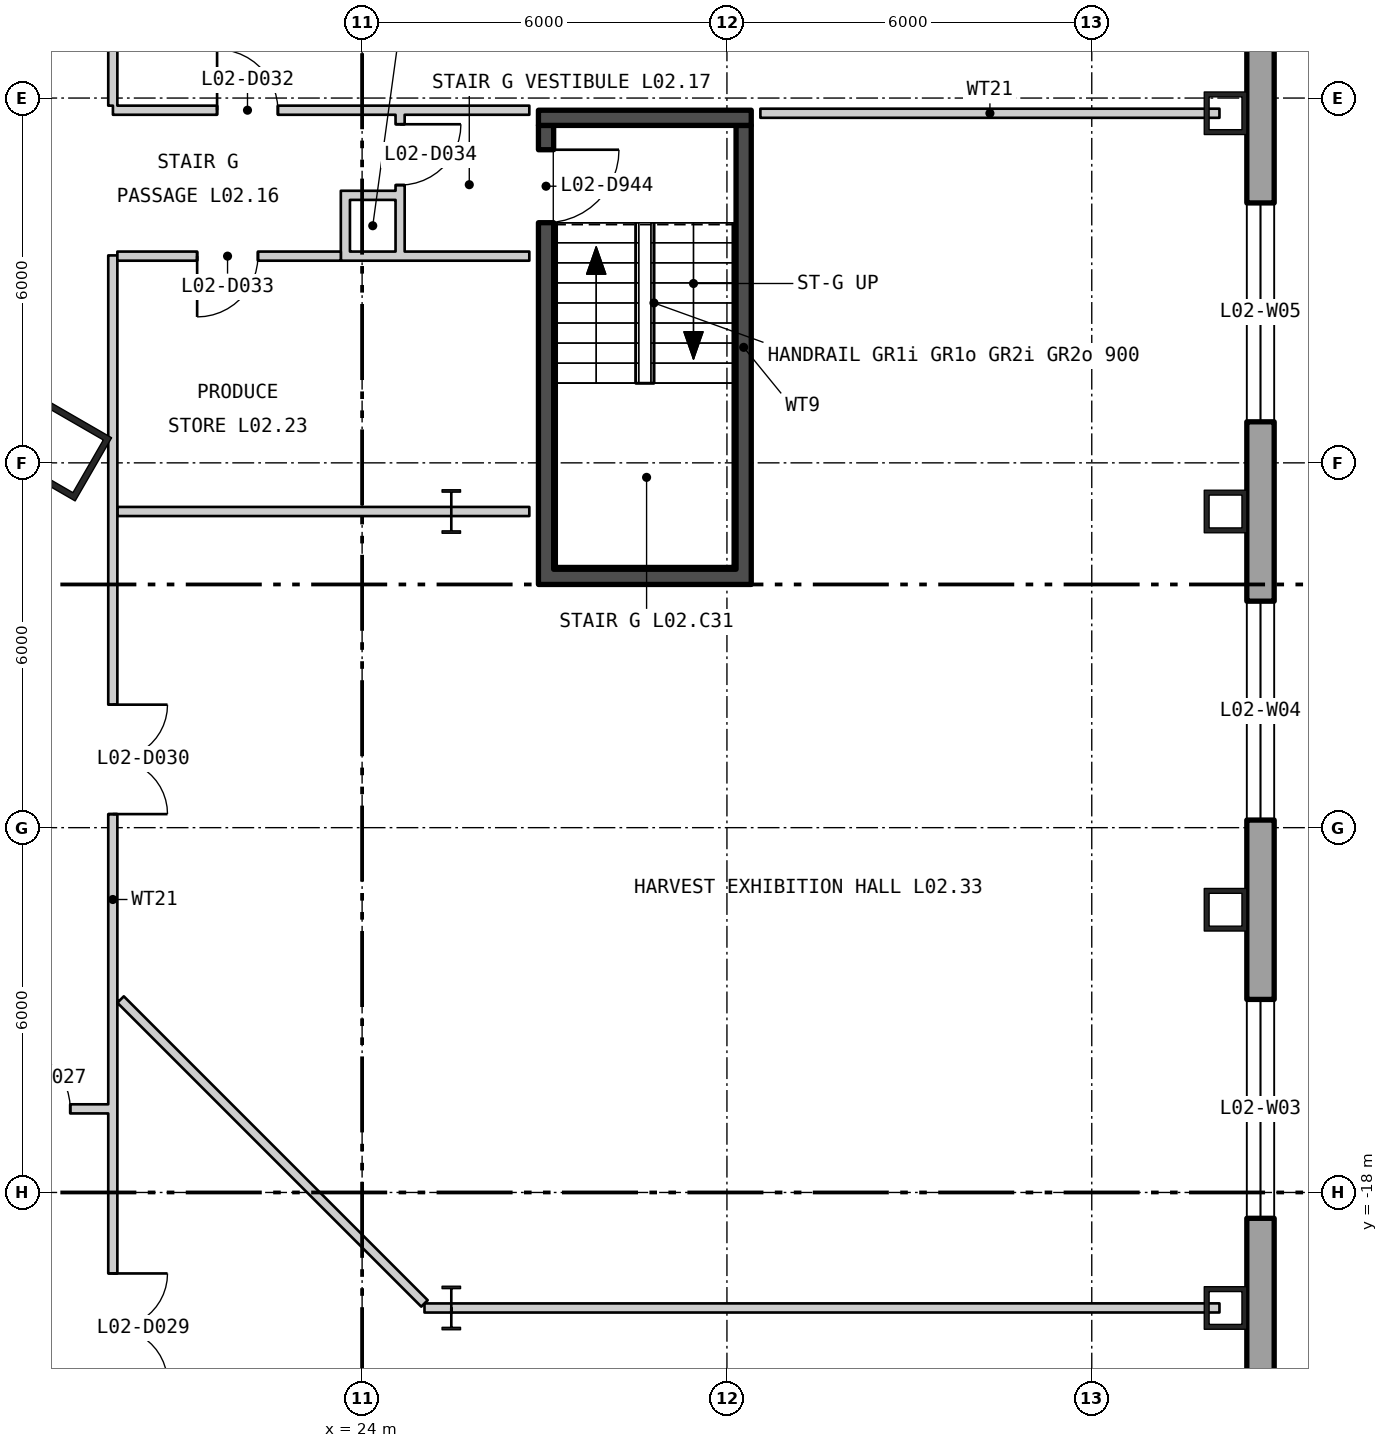
"""IFC4 building model, lengths in metres.
Left out: names, types, materials, properties, quantities, classifications, styles, units other than length and angle.
Written with IfcOpenShell. Run it as: python <this file> out.ifc"""

import sys

from ifc_helpers import new_model, si_unit, direction, frame, frame_2d, origin, origin_2d, place, context, subcontext, project, spatial, polyline, rectangle, hollow_rectangle, i_section, outline, extrude, element, fill, save


model = new_model("IFC4")
c1 = context("Model", 3, precision=1e-05, world=origin(), true_north=direction((0.0, 1.0)))
c2 = subcontext(c1, "Body", "Model", "MODEL_VIEW")
j1 = project(units=[si_unit("LENGTHUNIT", "METRE"), si_unit("PLANEANGLEUNIT", "RADIAN")], contexts=[c1])
p1 = place(None, origin())
s1 = spatial("IfcSite", under=j1, at=p1, CompositionType="ELEMENT")
p2 = place(p1, origin())
s2 = spatial("IfcBuilding", under=s1, at=p2, CompositionType="ELEMENT")
p3 = place(p2, frame((0.0, 0.0, 13.5)))
s3 = spatial("IfcBuildingStorey", under=s2, at=p3, CompositionType="ELEMENT", Elevation=13.5)
p4 = place(p3, frame((19.061, -5.807, 0.0), z_axis=(0.0, 0.0, 1.0), x_axis=(0.5, 0.866025403784, 0.0)))
e1 = element("IfcColumn", 1, at=p4, inside=s3, PredefinedType="COLUMN", context=c2, shape_type="SweptSolid", body=[
    extrude(hollow_rectangle(XDim=1.2, YDim=1.2, WallThickness=0.1, at=origin_2d()), origin(), (0.0, 0.0, 1.0), 5.1),
])
for number, where, z_axis, x_axis in (
    (2, (38.2, -19.9, 0.0), (0.0, 0.0, 1.0), (0.0, 1.0, 0.0)),
    (3, (38.2, -13.35, 0.0), (0.0, 0.0, 1.0), (0.0, 1.0, 0.0)),
    (4, (38.2, -6.8, 0.0), (0.0, 0.0, 1.0), (0.0, 1.0, 0.0)),
    (5, (38.2, -0.25, 0.0), (0.0, 0.0, 1.0), (0.0, 1.0, 0.0)),
):
    element("IfcColumn", number, at=place(p3, frame(where, z_axis=z_axis, x_axis=x_axis)), inside=s3, PredefinedType="COLUMN", context=c2, shape_type="SweptSolid", body=[
        extrude(hollow_rectangle(XDim=0.7, YDim=0.7, WallThickness=0.08, at=origin_2d()), origin(), (0.0, 0.0, 1.0), 5.1),
    ])
for number, where, z_axis, x_axis in (
    (6, (25.467, -6.8, 0.0), (0.0, 0.0, 1.0), (1.0, 0.0, 0.0)),
    (7, (25.467, -19.9, 0.0), (0.0, 0.0, 1.0), (1.0, 0.0, 0.0)),
):
    element("IfcColumn", number, at=place(p3, frame(where, z_axis=z_axis, x_axis=x_axis)), inside=s3, PredefinedType="COLUMN", context=c2, shape_type="SweptSolid", body=[
        extrude(i_section(OverallWidth=0.304, OverallDepth=0.716, WebThickness=0.021, FlangeThickness=0.04, at=origin_2d()), origin(), (0.0, 0.0, 1.0), 5.1),
    ])
p5 = place(p3, frame((38.775, -33.575, -0.4), z_axis=(0.0, 0.0, 1.0), x_axis=(0.0, 1.0, 0.0)))
e8 = element("IfcWall", 8, at=p5, inside=s3, PredefinedType="SOLIDWALL", context=c2, shape_type="SweptSolid", body=[
    extrude(outline(polyline([(-0.225, -0.225), (53.775, -0.225), (53.325, 0.225), (0.225, 0.225), (-0.225, -0.225)])), origin(), (0.0, 0.0, 1.0), 5.1),
])
p6 = place(p5, frame((2.05, 0.0, 1.3)))
e9 = element("IfcOpeningElement", 9, at=p6, cuts=e8, PredefinedType="OPENING", context=c2, shape_type="SweptSolid", body=[
    extrude(rectangle(XDim=3.6, YDim=3.2, at=frame_2d((1.8, 1.6))), frame((0.0, 0.235, 0.0), z_axis=(0.0, -1.0, 0.0), x_axis=(1.0, 0.0, 0.0)), (0.0, 0.0, 1.0), 0.47),
])
p7 = place(p5, frame((8.6, 0.0, 1.3)))
e10 = element("IfcOpeningElement", 10, at=p7, cuts=e8, PredefinedType="OPENING", context=c2, shape_type="SweptSolid", body=[
    extrude(rectangle(XDim=3.6, YDim=3.2, at=frame_2d((1.8, 1.6))), frame((0.0, 0.235, 0.0), z_axis=(0.0, -1.0, 0.0), x_axis=(1.0, 0.0, 0.0)), (0.0, 0.0, 1.0), 0.47),
])
p8 = place(p5, frame((15.15, 0.0, 1.3)))
e11 = element("IfcOpeningElement", 11, at=p8, cuts=e8, PredefinedType="OPENING", context=c2, shape_type="SweptSolid", body=[
    extrude(rectangle(XDim=3.6, YDim=3.2, at=frame_2d((1.8, 1.6))), frame((0.0, 0.235, 0.0), z_axis=(0.0, -1.0, 0.0), x_axis=(1.0, 0.0, 0.0)), (0.0, 0.0, 1.0), 0.47),
])
p9 = place(p5, frame((21.7, 0.0, 1.3)))
e12 = element("IfcOpeningElement", 12, at=p9, cuts=e8, PredefinedType="OPENING", context=c2, shape_type="SweptSolid", body=[
    extrude(rectangle(XDim=3.6, YDim=3.2, at=frame_2d((1.8, 1.6))), frame((0.0, 0.235, 0.0), z_axis=(0.0, -1.0, 0.0), x_axis=(1.0, 0.0, 0.0)), (0.0, 0.0, 1.0), 0.47),
])
p10 = place(p5, frame((28.25, 0.0, 1.3)))
e13 = element("IfcOpeningElement", 13, at=p10, cuts=e8, PredefinedType="OPENING", context=c2, shape_type="SweptSolid", body=[
    extrude(rectangle(XDim=3.6, YDim=3.2, at=frame_2d((1.8, 1.6))), frame((0.0, 0.235, 0.0), z_axis=(0.0, -1.0, 0.0), x_axis=(1.0, 0.0, 0.0)), (0.0, 0.0, 1.0), 0.47),
])
p11 = place(p5, frame((34.8, 0.0, 1.3)))
e14 = element("IfcOpeningElement", 14, at=p11, cuts=e8, PredefinedType="OPENING", context=c2, shape_type="SweptSolid", body=[
    extrude(rectangle(XDim=3.6, YDim=3.2, at=frame_2d((1.8, 1.6))), frame((0.0, 0.235, 0.0), z_axis=(0.0, -1.0, 0.0), x_axis=(1.0, 0.0, 0.0)), (0.0, 0.0, 1.0), 0.47),
])
p12 = place(p5, frame((41.35, 0.0, 1.3)))
e15 = element("IfcOpeningElement", 15, at=p12, cuts=e8, PredefinedType="OPENING", context=c2, shape_type="SweptSolid", body=[
    extrude(rectangle(XDim=3.6, YDim=3.2, at=frame_2d((1.8, 1.6))), frame((0.0, 0.235, 0.0), z_axis=(0.0, -1.0, 0.0), x_axis=(1.0, 0.0, 0.0)), (0.0, 0.0, 1.0), 0.47),
])
p13 = place(p5, frame((47.9, 0.0, 1.3)))
e16 = element("IfcOpeningElement", 16, at=p13, cuts=e8, PredefinedType="OPENING", context=c2, shape_type="SweptSolid", body=[
    extrude(rectangle(XDim=3.6, YDim=3.2, at=frame_2d((1.8, 1.6))), frame((0.0, 0.235, 0.0), z_axis=(0.0, -1.0, 0.0), x_axis=(1.0, 0.0, 0.0)), (0.0, 0.0, 1.0), 0.47),
])
p14 = place(p3, frame((27.025, -7.75, 0.0), z_axis=(0.0, 0.0, 1.0), x_axis=(0.0, 1.0, 0.0)))
e17 = element("IfcWall", 17, at=p14, inside=s3, PredefinedType="SHEAR", context=c2, shape_type="SweptSolid", body=[
    extrude(rectangle(XDim=7.3, YDim=0.25, at=frame_2d((3.65, 0.0))), origin(), (0.0, 0.0, 1.0), 4.88),
])
p15 = place(p14, frame((5.7, 0.0, 0.0)))
e18 = element("IfcOpeningElement", 18, at=p15, cuts=e17, PredefinedType="OPENING", context=c2, shape_type="SweptSolid", body=[
    extrude(rectangle(XDim=1.2, YDim=2.1, at=frame_2d((0.6, 1.05))), frame((0.0, 0.135, 0.0), z_axis=(0.0, -1.0, 0.0), x_axis=(1.0, 0.0, 0.0)), (0.0, 0.0, 1.0), 0.27),
])
p16 = place(p3, frame((30.275, -7.75, 0.0), z_axis=(0.0, 0.0, 1.0), x_axis=(0.0, 1.0, 0.0)))
e19 = element("IfcWall", 19, at=p16, inside=s3, PredefinedType="SHEAR", context=c2, shape_type="SweptSolid", body=[
    extrude(rectangle(XDim=7.3, YDim=0.25, at=frame_2d((3.65, 0.0))), origin(), (0.0, 0.0, 1.0), 4.88),
])
for number, where, z_axis, x_axis in (
    (20, (26.9, -7.875, 0.0), (0.0, 0.0, 1.0), (1.0, 0.0, 0.0)),
    (21, (26.9, -0.325, 0.0), (0.0, 0.0, 1.0), (1.0, 0.0, 0.0)),
):
    element("IfcWall", number, at=place(p3, frame(where, z_axis=z_axis, x_axis=x_axis)), inside=s3, PredefinedType="SHEAR", context=c2, shape_type="SweptSolid", body=[
        extrude(rectangle(XDim=3.5, YDim=0.25, at=frame_2d((1.75, 0.0))), origin(), (0.0, 0.0, 1.0), 4.88),
    ])
p17 = place(p3, frame((17.575, -16.625, 0.0), z_axis=(0.0, 0.0, 1.0), x_axis=(1.0, 0.0, 0.0)))
e22 = element("IfcWall", 22, at=p17, inside=s3, PredefinedType="PARTITIONING", context=c2, shape_type="SweptSolid", body=[
    extrude(rectangle(XDim=2.25, YDim=0.15, at=frame_2d((1.125, 0.0))), origin(), (0.0, 0.0, 1.0), 4.88),
])
p18 = place(p17, frame((0.625, 0.0, 0.0)))
e23 = element("IfcOpeningElement", 23, at=p18, cuts=e22, PredefinedType="OPENING", context=c2, shape_type="SweptSolid", body=[
    extrude(rectangle(XDim=1.0, YDim=2.1, at=frame_2d((0.5, 1.05))), frame((0.0, 0.085, 0.0), z_axis=(0.0, -1.0, 0.0), x_axis=(1.0, 0.0, 0.0)), (0.0, 0.0, 1.0), 0.17),
])
p19 = place(p3, frame((19.9, -23.775, 0.0), z_axis=(0.0, 0.0, 1.0), x_axis=(0.0, 1.0, 0.0)))
e24 = element("IfcWall", 24, at=p19, inside=s3, PredefinedType="PARTITIONING", context=c2, shape_type="SweptSolid", body=[
    extrude(rectangle(XDim=21.187, YDim=0.15, at=frame_2d((10.594, 0.0))), origin(), (0.0, 0.0, 1.0), 4.88),
])
p20 = place(p19, frame((2.643, 0.0, 0.0)))
e25 = element("IfcOpeningElement", 25, at=p20, cuts=e24, PredefinedType="OPENING", context=c2, shape_type="SweptSolid", body=[
    extrude(rectangle(XDim=1.8, YDim=2.1, at=frame_2d((0.9, 1.05))), frame((0.0, 0.085, 0.0), z_axis=(0.0, -1.0, 0.0), x_axis=(1.0, 0.0, 0.0)), (0.0, 0.0, 1.0), 0.17),
])
p21 = place(p19, frame((11.998, 0.0, 0.0)))
e26 = element("IfcOpeningElement", 26, at=p21, cuts=e24, PredefinedType="OPENING", context=c2, shape_type="SweptSolid", body=[
    extrude(rectangle(XDim=1.8, YDim=2.1, at=frame_2d((0.9, 1.05))), frame((0.0, 0.085, 0.0), z_axis=(0.0, -1.0, 0.0), x_axis=(1.0, 0.0, 0.0)), (0.0, 0.0, 1.0), 0.17),
])
p22 = place(p3, frame((19.9, -0.125, 0.0), z_axis=(0.0, 0.0, 1.0), x_axis=(0.0, 1.0, 0.0)))
e27 = element("IfcWall", 27, at=p22, inside=s3, PredefinedType="PARTITIONING", context=c2, shape_type="SweptSolid", body=[
    extrude(rectangle(XDim=1.15, YDim=0.15, at=frame_2d((0.575, 0.0))), origin(), (0.0, 0.0, 1.0), 4.88),
])
p23 = place(p3, frame((19.902, -0.2, 0.0), z_axis=(0.0, 0.0, 1.0), x_axis=(1.0, 0.0, 0.0)))
e28 = element("IfcWall", 28, at=p23, inside=s3, PredefinedType="PARTITIONING", context=c2, shape_type="SweptSolid", body=[
    extrude(rectangle(XDim=6.848, YDim=0.15, at=frame_2d((3.424, 0.0))), origin(), (0.0, 0.0, 1.0), 4.88),
])
p24 = place(p23, frame((1.713, 0.0, 0.0)))
e29 = element("IfcOpeningElement", 29, at=p24, cuts=e28, PredefinedType="OPENING", context=c2, shape_type="SweptSolid", body=[
    extrude(rectangle(XDim=1.0, YDim=2.1, at=frame_2d((0.5, 1.05))), frame((0.0, 0.085, 0.0), z_axis=(0.0, -1.0, 0.0), x_axis=(1.0, 0.0, 0.0)), (0.0, 0.0, 1.0), 0.17),
])
p25 = place(p3, frame((19.975, -6.8, 0.0), z_axis=(0.0, 0.0, 1.0), x_axis=(1.0, 0.0, 0.0)))
e30 = element("IfcWall", 30, at=p25, inside=s3, PredefinedType="PARTITIONING", context=c2, shape_type="SweptSolid", body=[
    extrude(rectangle(XDim=6.775, YDim=0.15, at=frame_2d((3.388, 0.0))), origin(), (0.0, 0.0, 1.0), 4.09),
])
p26 = place(p3, frame((19.975, -2.6, 0.0), z_axis=(0.0, 0.0, 1.0), x_axis=(1.0, 0.0, 0.0)))
e31 = element("IfcWall", 31, at=p26, inside=s3, PredefinedType="PARTITIONING", context=c2, shape_type="SweptSolid", body=[
    extrude(rectangle(XDim=3.675, YDim=0.15, at=frame_2d((1.837, 0.0))), origin(), (0.0, 0.0, 1.0), 4.88),
])
p27 = place(p26, frame((1.312, 0.0, 0.0)))
e32 = element("IfcOpeningElement", 32, at=p27, cuts=e31, PredefinedType="OPENING", context=c2, shape_type="SweptSolid", body=[
    extrude(rectangle(XDim=1.0, YDim=2.1, at=frame_2d((0.5, 1.05))), frame((0.0, 0.085, 0.0), z_axis=(0.0, -1.0, 0.0), x_axis=(1.0, 0.0, 0.0)), (0.0, 0.0, 1.0), 0.17),
])
p28 = place(p3, frame((20.028, -14.827, 0.0), z_axis=(0.0, 0.0, 1.0), x_axis=(0.707106781187, -0.707106781187, 0.0)))
e33 = element("IfcWall", 33, at=p28, inside=s3, PredefinedType="PARTITIONING", context=c2, shape_type="SweptSolid", body=[
    extrude(rectangle(XDim=7.068, YDim=0.15, at=frame_2d((3.534, 0.0))), origin(), (0.0, 0.0, 1.0), 4.88),
])
p29 = place(p3, frame((23.725, -2.675, 0.0), z_axis=(0.0, 0.0, 1.0), x_axis=(0.0, 1.0, 0.0)))
e34 = element("IfcWall", 34, at=p29, inside=s3, PredefinedType="PARTITIONING", context=c2, shape_type="SweptSolid", body=[
    extrude(rectangle(XDim=1.15, YDim=0.15, at=frame_2d((0.575, 0.0))), origin(), (0.0, 0.0, 1.0), 4.88),
])
for number, where, z_axis, x_axis in (
    (35, (23.8, -2.6, 0.0), (0.0, 0.0, 1.0), (1.0, 0.0, 0.0)),
    (36, (23.8, -1.6, 0.0), (0.0, 0.0, 1.0), (1.0, 0.0, 0.0)),
):
    element("IfcWall", number, at=place(p3, frame(where, z_axis=z_axis, x_axis=x_axis)), inside=s3, PredefinedType="PARTITIONING", context=c2, shape_type="SweptSolid", body=[
        extrude(rectangle(XDim=0.75, YDim=0.15, at=frame_2d((0.375, 0.0))), origin(), (0.0, 0.0, 1.0), 4.88),
    ])
p30 = place(p3, frame((24.625, -2.675, 0.0), z_axis=(0.0, 0.0, 1.0), x_axis=(0.0, 1.0, 0.0)))
e37 = element("IfcWall", 37, at=p30, inside=s3, PredefinedType="PARTITIONING", context=c2, shape_type="SweptSolid", body=[
    extrude(rectangle(XDim=1.087, YDim=0.15, at=frame_2d((0.543, 0.0))), origin(), (0.0, 0.0, 1.0), 4.88),
])
p31 = place(p3, frame((24.625, -1.588, 0.0), z_axis=(0.0, 0.0, 1.0), x_axis=(0.0, 1.0, 0.0)))
e38 = element("IfcWall", 38, at=p31, inside=s3, PredefinedType="PARTITIONING", context=c2, shape_type="SweptSolid", body=[
    extrude(rectangle(XDim=1.313, YDim=0.15, at=frame_2d((0.656, 0.0))), origin(), (0.0, 0.0, 1.0), 4.88),
])
p32 = place(p31, frame((0.157, 0.0, 0.0)))
e39 = element("IfcOpeningElement", 39, at=p32, cuts=e38, PredefinedType="OPENING", context=c2, shape_type="SweptSolid", body=[
    extrude(rectangle(XDim=1.0, YDim=2.1, at=frame_2d((0.5, 1.05))), frame((0.0, 0.085, 0.0), z_axis=(0.0, -1.0, 0.0), x_axis=(1.0, 0.0, 0.0)), (0.0, 0.0, 1.0), 0.17),
])
p33 = place(p3, frame((24.7, -2.6, 0.0), z_axis=(0.0, 0.0, 1.0), x_axis=(1.0, 0.0, 0.0)))
e40 = element("IfcWall", 40, at=p33, inside=s3, PredefinedType="PARTITIONING", context=c2, shape_type="SweptSolid", body=[
    extrude(rectangle(XDim=2.05, YDim=0.15, at=frame_2d((1.025, 0.0))), origin(), (0.0, 0.0, 1.0), 4.88),
])
p34 = place(p3, frame((25.026, -19.9, 0.0), z_axis=(0.0, 0.0, 1.0), x_axis=(1.0, 0.0, 0.0)))
e41 = element("IfcWall", 41, at=p34, inside=s3, PredefinedType="PARTITIONING", context=c2, shape_type="SweptSolid", body=[
    extrude(rectangle(XDim=0.441, YDim=0.15, at=frame_2d((0.221, 0.0))), origin(), (0.0, 0.0, 1.0), 4.88),
])
p35 = place(p3, frame((25.467, -19.9, 0.0), z_axis=(0.0, 0.0, 1.0), x_axis=(0.999999996867, 7.9157761e-05, 0.0)))
e42 = element("IfcWall", 42, at=p35, inside=s3, PredefinedType="PARTITIONING", context=c2, shape_type="SweptSolid", body=[
    extrude(rectangle(XDim=12.633, YDim=0.15, at=frame_2d((6.316, 0.0))), origin(), (0.0, 0.0, 1.0), 4.09),
])
p36 = place(p3, frame((30.55, -0.25, 0.0), z_axis=(0.0, 0.0, 1.0), x_axis=(1.0, 0.0, 0.0)))
e43 = element("IfcWall", 43, at=p36, inside=s3, PredefinedType="PARTITIONING", context=c2, shape_type="SweptSolid", body=[
    extrude(rectangle(XDim=7.55, YDim=0.15, at=frame_2d((3.775, 0.0))), origin(), (0.0, 0.0, 1.0), 4.88),
])
p37 = place(p8, origin())
e44 = element("IfcWindow", 44, at=p37, inside=s3, PartitioningType="SINGLE_PANEL", PredefinedType="WINDOW", context=c2, shape_type="SweptSolid", body=[
    extrude(rectangle(XDim=3.6, YDim=3.2, at=frame_2d((1.8, 1.6))), frame((0.0, 0.105, 0.0), z_axis=(0.0, -1.0, 0.0), x_axis=(1.0, 0.0, 0.0)), (0.0, 0.0, 1.0), 0.06),
])
fill(e11, e44)
p38 = place(p9, origin())
e45 = element("IfcWindow", 45, at=p38, inside=s3, PartitioningType="SINGLE_PANEL", PredefinedType="WINDOW", context=c2, shape_type="SweptSolid", body=[
    extrude(rectangle(XDim=3.6, YDim=3.2, at=frame_2d((1.8, 1.6))), frame((0.0, 0.105, 0.0), z_axis=(0.0, -1.0, 0.0), x_axis=(1.0, 0.0, 0.0)), (0.0, 0.0, 1.0), 0.06),
])
fill(e12, e45)
p39 = place(p10, origin())
e46 = element("IfcWindow", 46, at=p39, inside=s3, PartitioningType="SINGLE_PANEL", PredefinedType="WINDOW", context=c2, shape_type="SweptSolid", body=[
    extrude(rectangle(XDim=3.6, YDim=3.2, at=frame_2d((1.8, 1.6))), frame((0.0, 0.105, 0.0), z_axis=(0.0, -1.0, 0.0), x_axis=(1.0, 0.0, 0.0)), (0.0, 0.0, 1.0), 0.06),
])
fill(e13, e46)
p40 = place(p15, origin())
e47 = element("IfcDoor", 47, at=p40, inside=s3, OperationType="SINGLE_SWING_RIGHT", PredefinedType="DOOR", context=c2, shape_type="SweptSolid", body=[
    extrude(rectangle(XDim=1.2, YDim=2.1, at=frame_2d((0.6, 1.05))), frame((0.0, 0.025, 0.0), z_axis=(0.0, -1.0, 0.0), x_axis=(1.0, 0.0, 0.0)), (0.0, 0.0, 1.0), 0.05),
])
fill(e18, e47)
p41 = place(p18, origin())
e48 = element("IfcDoor", 48, at=p41, inside=s3, OperationType="SINGLE_SWING_RIGHT", PredefinedType="DOOR", context=c2, shape_type="SweptSolid", body=[
    extrude(rectangle(XDim=1.0, YDim=2.1, at=frame_2d((0.5, 1.05))), frame((0.0, 0.025, 0.0), z_axis=(0.0, -1.0, 0.0), x_axis=(1.0, 0.0, 0.0)), (0.0, 0.0, 1.0), 0.05),
])
fill(e23, e48)
p42 = place(p20, origin())
e49 = element("IfcDoor", 49, at=p42, inside=s3, OperationType="DOUBLE_DOOR_SINGLE_SWING", PredefinedType="DOOR", context=c2, shape_type="SweptSolid", body=[
    extrude(rectangle(XDim=1.8, YDim=2.1, at=frame_2d((0.9, 1.05))), frame((0.0, 0.025, 0.0), z_axis=(0.0, -1.0, 0.0), x_axis=(1.0, 0.0, 0.0)), (0.0, 0.0, 1.0), 0.05),
])
fill(e25, e49)
p43 = place(p21, origin())
e50 = element("IfcDoor", 50, at=p43, inside=s3, OperationType="DOUBLE_DOOR_SINGLE_SWING", PredefinedType="DOOR", context=c2, shape_type="SweptSolid", body=[
    extrude(rectangle(XDim=1.8, YDim=2.1, at=frame_2d((0.9, 1.05))), frame((0.0, 0.025, 0.0), z_axis=(0.0, -1.0, 0.0), x_axis=(1.0, 0.0, 0.0)), (0.0, 0.0, 1.0), 0.05),
])
fill(e26, e50)
p44 = place(p24, origin())
e51 = element("IfcDoor", 51, at=p44, inside=s3, OperationType="SINGLE_SWING_RIGHT", PredefinedType="DOOR", context=c2, shape_type="SweptSolid", body=[
    extrude(rectangle(XDim=1.0, YDim=2.1, at=frame_2d((0.5, 1.05))), frame((0.0, 0.025, 0.0), z_axis=(0.0, -1.0, 0.0), x_axis=(1.0, 0.0, 0.0)), (0.0, 0.0, 1.0), 0.05),
])
fill(e29, e51)
p45 = place(p27, origin())
e52 = element("IfcDoor", 52, at=p45, inside=s3, OperationType="SINGLE_SWING_LEFT", PredefinedType="DOOR", context=c2, shape_type="SweptSolid", body=[
    extrude(rectangle(XDim=1.0, YDim=2.1, at=frame_2d((0.5, 1.05))), frame((0.0, 0.025, 0.0), z_axis=(0.0, -1.0, 0.0), x_axis=(1.0, 0.0, 0.0)), (0.0, 0.0, 1.0), 0.05),
])
fill(e32, e52)
p46 = place(p32, origin())
e53 = element("IfcDoor", 53, at=p46, inside=s3, OperationType="SINGLE_SWING_RIGHT", PredefinedType="DOOR", context=c2, shape_type="SweptSolid", body=[
    extrude(rectangle(XDim=1.0, YDim=2.1, at=frame_2d((0.5, 1.05))), frame((0.0, 0.025, 0.0), z_axis=(0.0, -1.0, 0.0), x_axis=(1.0, 0.0, 0.0)), (0.0, 0.0, 1.0), 0.05),
])
fill(e39, e53)
save(model, sys.argv[1])
